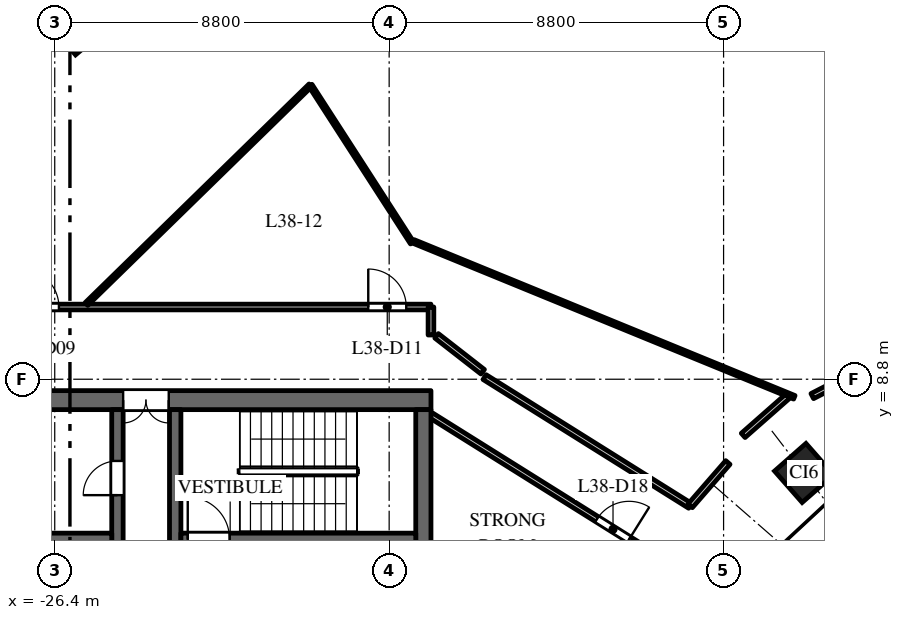
"""IFC4 building model, lengths in metres.
Left out: names, types, materials, properties, quantities, classifications, styles, units other than length and angle.
Written with IfcOpenShell. Run it as: python <this file> out.ifc"""

import sys

from ifc_helpers import new_model, si_unit, direction, frame, frame_2d, origin, origin_2d, place, context, subcontext, project, spatial, rectangle, extrude, element, fill, save


model = new_model("IFC4")
c1 = context("Model", 3, precision=1e-05, world=origin(), true_north=direction((0.0, 1.0)))
c2 = subcontext(c1, "Body", "Model", "MODEL_VIEW")
j1 = project(units=[si_unit("LENGTHUNIT", "METRE"), si_unit("PLANEANGLEUNIT", "RADIAN")], contexts=[c1])
p1 = place(None, origin())
s1 = spatial("IfcSite", under=j1, at=p1, CompositionType="ELEMENT")
p2 = place(p1, origin())
s2 = spatial("IfcBuilding", under=s1, at=p2, CompositionType="ELEMENT")
p3 = place(p2, frame((0.0, 0.0, 166.0)))
s3 = spatial("IfcBuildingStorey", under=s2, at=p3, CompositionType="ELEMENT", Elevation=166.0)
p4 = place(p3, frame((-25.783, 18.18, 0.0), z_axis=(0.0, 0.0, 1.0), x_axis=(-0.763035199656, -0.646356932419, 0.0)))
e1 = element("IfcColumn", 1, at=p4, inside=s3, PredefinedType="COLUMN", context=c2, shape_type="SweptSolid", body=[
    extrude(rectangle(XDim=1.2, YDim=1.2, at=origin_2d()), origin(), (0.0, 0.0, 1.0), 4.0),
])
p5 = place(p3, frame((-6.682, 6.334, 0.0), z_axis=(0.0, 0.0, 1.0), x_axis=(-0.75102249095, -0.660276622399, 0.0)))
e2 = element("IfcColumn", 2, at=p5, inside=s3, PredefinedType="COLUMN", context=c2, shape_type="SweptSolid", body=[
    extrude(rectangle(XDim=1.1, YDim=1.1, at=origin_2d()), origin(), (0.0, 0.0, 1.0), 4.0),
])
p6 = place(p3, frame((-16.5, 8.25, 0.0), z_axis=(0.0, 0.0, 1.0), x_axis=(-1.0, 0.0, 0.0)))
e3 = element("IfcWall", 3, at=p6, inside=s3, PredefinedType="SHEAR", context=c2, shape_type="SweptSolid", body=[
    extrude(rectangle(XDim=15.0, YDim=0.5, at=frame_2d((7.5, 0.0))), origin(), (0.0, 0.0, 1.0), 3.7),
])
p7 = place(p6, frame((6.9, 0.0, 0.0)))
e4 = element("IfcOpeningElement", 4, at=p7, cuts=e3, PredefinedType="OPENING", context=c2, shape_type="SweptSolid", body=[
    extrude(rectangle(XDim=1.2, YDim=2.1, at=frame_2d((0.6, 1.05))), frame((0.0, 0.26, 0.0), z_axis=(0.0, -1.0, 0.0), x_axis=(1.0, 0.0, 0.0)), (0.0, 0.0, 1.0), 0.52),
])
p8 = place(p6, frame((12.425, 0.0, 0.0)))
e5 = element("IfcOpeningElement", 5, at=p8, cuts=e3, PredefinedType="OPENING", context=c2, shape_type="SweptSolid", body=[
    extrude(rectangle(XDim=0.9, YDim=2.1, at=frame_2d((0.45, 1.05))), frame((0.0, 0.26, 0.0), z_axis=(0.0, -1.0, 0.0), x_axis=(1.0, 0.0, 0.0)), (0.0, 0.0, 1.0), 0.52),
])
p9 = place(p3, frame((-24.75, -8.0, 0.0), z_axis=(0.0, 0.0, 1.0), x_axis=(0.0, 1.0, 0.0)))
e6 = element("IfcWall", 6, at=p9, inside=s3, PredefinedType="SHEAR", context=c2, shape_type="SweptSolid", body=[
    extrude(rectangle(XDim=16.0, YDim=0.3, at=frame_2d((8.0, 0.0))), origin(), (0.0, 0.0, 1.0), 3.7),
])
p10 = place(p9, frame((4.425, 0.0, 0.0)))
e7 = element("IfcOpeningElement", 7, at=p10, cuts=e6, PredefinedType="OPENING", context=c2, shape_type="SweptSolid", body=[
    extrude(rectangle(XDim=1.1, YDim=2.1, at=frame_2d((0.55, 1.05))), frame((0.0, 0.16, 0.0), z_axis=(0.0, -1.0, 0.0), x_axis=(1.0, 0.0, 0.0)), (0.0, 0.0, 1.0), 0.32),
])
p11 = place(p9, frame((7.45, 0.0, 0.0)))
e8 = element("IfcOpeningElement", 8, at=p11, cuts=e6, PredefinedType="OPENING", context=c2, shape_type="SweptSolid", body=[
    extrude(rectangle(XDim=1.1, YDim=2.1, at=frame_2d((0.55, 1.05))), frame((0.0, 0.16, 0.0), z_axis=(0.0, -1.0, 0.0), x_axis=(1.0, 0.0, 0.0)), (0.0, 0.0, 1.0), 0.32),
])
p12 = place(p9, frame((10.475, 0.0, 0.0)))
e9 = element("IfcOpeningElement", 9, at=p12, cuts=e6, PredefinedType="OPENING", context=c2, shape_type="SweptSolid", body=[
    extrude(rectangle(XDim=1.1, YDim=2.1, at=frame_2d((0.55, 1.05))), frame((0.0, 0.16, 0.0), z_axis=(0.0, -1.0, 0.0), x_axis=(1.0, 0.0, 0.0)), (0.0, 0.0, 1.0), 0.32),
])
p13 = place(p9, frame((13.75, 0.0, 0.0)))
e10 = element("IfcOpeningElement", 10, at=p13, cuts=e6, PredefinedType="OPENING", context=c2, shape_type="SweptSolid", body=[
    extrude(rectangle(XDim=0.9, YDim=2.1, at=frame_2d((0.45, 1.05))), frame((0.0, 0.16, 0.0), z_axis=(0.0, -1.0, 0.0), x_axis=(1.0, 0.0, 0.0)), (0.0, 0.0, 1.0), 0.32),
])
p14 = place(p9, frame((1.975, 0.0, 0.0)))
e11 = element("IfcOpeningElement", 11, at=p14, cuts=e6, PredefinedType="OPENING", context=c2, shape_type="SweptSolid", body=[
    extrude(rectangle(XDim=0.9, YDim=2.1, at=frame_2d((0.45, 1.05))), frame((0.0, 0.16, 0.0), z_axis=(0.0, -1.0, 0.0), x_axis=(1.0, 0.0, 0.0)), (0.0, 0.0, 1.0), 0.32),
])
p15 = place(p9, frame((0.35, 0.0, 0.0)))
e12 = element("IfcOpeningElement", 12, at=p15, cuts=e6, PredefinedType="OPENING", context=c2, shape_type="SweptSolid", body=[
    extrude(rectangle(XDim=0.9, YDim=2.1, at=frame_2d((0.45, 1.05))), frame((0.0, 0.16, 0.0), z_axis=(0.0, -1.0, 0.0), x_axis=(1.0, 0.0, 0.0)), (0.0, 0.0, 1.0), 0.32),
])
p16 = place(p3, frame((-16.7, -8.0, 0.0), z_axis=(0.0, 0.0, 1.0), x_axis=(0.0, 1.0, 0.0)))
e13 = element("IfcWall", 13, at=p16, inside=s3, PredefinedType="SHEAR", context=c2, shape_type="SweptSolid", body=[
    extrude(rectangle(XDim=16.0, YDim=0.4, at=frame_2d((8.0, 0.0))), origin(), (0.0, 0.0, 1.0), 3.7),
])
p17 = place(p3, frame((-24.9, 4.6, 0.0), z_axis=(0.0, 0.0, 1.0), x_axis=(-1.0, 0.0, 0.0)))
e14 = element("IfcWall", 14, at=p17, inside=s3, PredefinedType="SHEAR", context=c2, shape_type="SweptSolid", body=[
    extrude(rectangle(XDim=6.1, YDim=0.3, at=frame_2d((3.05, 0.0))), origin(), (0.0, 0.0, 1.0), 3.7),
])
p18 = place(p17, frame((4.2, 0.0, 0.0)))
e15 = element("IfcOpeningElement", 15, at=p18, cuts=e14, PredefinedType="OPENING", context=c2, shape_type="SweptSolid", body=[
    extrude(rectangle(XDim=0.9, YDim=2.1, at=frame_2d((0.45, 1.05))), frame((0.0, 0.16, 0.0), z_axis=(0.0, -1.0, 0.0), x_axis=(1.0, 0.0, 0.0)), (0.0, 0.0, 1.0), 0.32),
])
p19 = place(p3, frame((-23.23, 2.25, 0.0), z_axis=(0.0, 0.0, 1.0), x_axis=(0.0, 1.0, 0.0)))
e16 = element("IfcWall", 16, at=p19, inside=s3, PredefinedType="SHEAR", context=c2, shape_type="SweptSolid", body=[
    extrude(rectangle(XDim=5.75, YDim=0.3, at=frame_2d((2.875, 0.0))), origin(), (0.0, 0.0, 1.0), 3.7),
])
p20 = place(p19, frame((0.6, 0.0, 0.0)))
e17 = element("IfcOpeningElement", 17, at=p20, cuts=e16, PredefinedType="OPENING", context=c2, shape_type="SweptSolid", body=[
    extrude(rectangle(XDim=1.0, YDim=2.1, at=frame_2d((0.5, 1.05))), frame((0.0, 0.16, 0.0), z_axis=(0.0, -1.0, 0.0), x_axis=(1.0, 0.0, 0.0)), (0.0, 0.0, 1.0), 0.32),
])
p21 = place(p3, frame((-16.9, 4.6, 0.0), z_axis=(0.0, 0.0, 1.0), x_axis=(-1.0, 0.0, 0.0)))
e18 = element("IfcWall", 18, at=p21, inside=s3, PredefinedType="SHEAR", context=c2, shape_type="SweptSolid", body=[
    extrude(rectangle(XDim=6.18, YDim=0.3, at=frame_2d((3.09, 0.0))), origin(), (0.0, 0.0, 1.0), 3.7),
])
p22 = place(p21, frame((4.9, 0.0, 0.0)))
e19 = element("IfcOpeningElement", 19, at=p22, cuts=e18, PredefinedType="OPENING", context=c2, shape_type="SweptSolid", body=[
    extrude(rectangle(XDim=1.1, YDim=2.1, at=frame_2d((0.55, 1.05))), frame((0.0, 0.16, 0.0), z_axis=(0.0, -1.0, 0.0), x_axis=(1.0, 0.0, 0.0)), (0.0, 0.0, 1.0), 0.32),
])
p23 = place(p3, frame((-26.396, 18.943, 0.0), z_axis=(0.0, 0.0, 1.0), x_axis=(-0.717214761864, -0.696852197647, 0.0)))
e20 = element("IfcWall", 20, at=p23, inside=s3, PredefinedType="STANDARD", context=c2, shape_type="SweptSolid", body=[
    extrude(rectangle(XDim=4.424, YDim=0.15, at=frame_2d((2.212, 0.0))), origin(), (0.0, 0.0, 1.0), 3.7),
])
p24 = place(p23, frame((1.712, 0.0, 0.0)))
e21 = element("IfcOpeningElement", 21, at=p24, cuts=e20, PredefinedType="OPENING", context=c2, shape_type="SweptSolid", body=[
    extrude(rectangle(XDim=1.0, YDim=2.4, at=frame_2d((0.5, 1.2))), frame((0.0, 0.085, 0.0), z_axis=(0.0, -1.0, 0.0), x_axis=(1.0, 0.0, 0.0)), (0.0, 0.0, 1.0), 0.17),
])
p25 = place(p3, frame((-31.5, 10.7, 0.0), z_axis=(0.0, 0.0, 1.0), x_axis=(1.0, 0.0, 0.0)))
e22 = element("IfcWall", 22, at=p25, inside=s3, PredefinedType="PARTITIONING", context=c2, shape_type="SweptSolid", body=[
    extrude(rectangle(XDim=15.0, YDim=0.15, at=frame_2d((7.5, 0.0))), origin(), (0.0, 0.0, 1.0), 3.1),
])
p26 = place(p25, frame((4.21, 0.0, 0.0)))
e23 = element("IfcOpeningElement", 23, at=p26, cuts=e22, PredefinedType="OPENING", context=c2, shape_type="SweptSolid", body=[
    extrude(rectangle(XDim=1.0, YDim=2.1, at=frame_2d((0.5, 1.05))), frame((0.0, 0.085, 0.0), z_axis=(0.0, -1.0, 0.0), x_axis=(1.0, 0.0, 0.0)), (0.0, 0.0, 1.0), 0.17),
])
p27 = place(p25, frame((13.35, 0.0, 0.0)))
e24 = element("IfcOpeningElement", 24, at=p27, cuts=e22, PredefinedType="OPENING", context=c2, shape_type="SweptSolid", body=[
    extrude(rectangle(XDim=1.0, YDim=2.1, at=frame_2d((0.5, 1.05))), frame((0.0, 0.085, 0.0), z_axis=(0.0, -1.0, 0.0), x_axis=(1.0, 0.0, 0.0)), (0.0, 0.0, 1.0), 0.17),
])
p28 = place(p3, frame((-25.566, 10.778, 0.0), z_axis=(0.0, 0.0, 1.0), x_axis=(0.715430617602, 0.698683784982, 0.0)))
e25 = element("IfcWall", 25, at=p28, inside=s3, PredefinedType="PARTITIONING", context=c2, shape_type="SweptSolid", body=[
    extrude(rectangle(XDim=8.237, YDim=0.1, at=frame_2d((4.118, 0.0))), origin(), (0.0, 0.0, 1.0), 2.75),
])
p29 = place(p3, frame((-19.673, 16.533, 0.0), z_axis=(0.0, 0.0, 1.0), x_axis=(0.542297022656, -0.840186847801, 0.0)))
e26 = element("IfcWall", 26, at=p29, inside=s3, PredefinedType="PARTITIONING", context=c2, shape_type="SweptSolid", body=[
    extrude(rectangle(XDim=4.935, YDim=0.1, at=frame_2d((2.467, 0.0))), origin(), (0.0, 0.0, 1.0), 3.7),
])
p30 = place(p3, frame((-16.963, 12.427, 0.0), z_axis=(0.0, 0.0, 1.0), x_axis=(0.925484473487, -0.378785545308, 0.0)))
e27 = element("IfcWall", 27, at=p30, inside=s3, PredefinedType="PARTITIONING", context=c2, shape_type="SweptSolid", body=[
    extrude(rectangle(XDim=10.832, YDim=0.1, at=frame_2d((5.416, 0.0))), origin(), (0.0, 0.0, 1.0), 3.7),
])
p31 = place(p3, frame((-16.5, 9.964, 0.0), z_axis=(0.0, 0.0, 1.0), x_axis=(0.0, 1.0, 0.0)))
e28 = element("IfcWall", 28, at=p31, inside=s3, PredefinedType="PARTITIONING", context=c2, shape_type="SweptSolid", body=[
    extrude(rectangle(XDim=0.736, YDim=0.15, at=frame_2d((0.368, 0.0))), origin(), (0.0, 0.0, 1.0), 3.7),
])
p32 = place(p3, frame((-16.5, 7.851, 0.0), z_axis=(0.0, 0.0, 1.0), x_axis=(0.847690706888, -0.530490777917, 0.0)))
e29 = element("IfcWall", 29, at=p32, inside=s3, PredefinedType="PARTITIONING", context=c2, shape_type="SweptSolid", body=[
    extrude(rectangle(XDim=6.781, YDim=0.15, at=frame_2d((3.39, 0.0))), origin(), (0.0, 0.0, 1.0), 3.7),
])
p33 = place(p32, frame((5.151, 0.0, 0.0)))
e30 = element("IfcOpeningElement", 30, at=p33, cuts=e29, PredefinedType="OPENING", context=c2, shape_type="SweptSolid", body=[
    extrude(rectangle(XDim=1.0, YDim=2.1, at=frame_2d((0.5, 1.05))), frame((0.0, 0.085, 0.0), z_axis=(0.0, -1.0, 0.0), x_axis=(1.0, 0.0, 0.0)), (0.0, 0.0, 1.0), 0.17),
])
p34 = place(p3, frame((-15.089, 8.856, 0.0), z_axis=(0.0, 0.0, 1.0), x_axis=(0.847602682855, -0.530631408811, 0.0)))
e31 = element("IfcWall", 31, at=p34, inside=s3, PredefinedType="PARTITIONING", context=c2, shape_type="SweptSolid", body=[
    extrude(rectangle(XDim=6.383, YDim=0.15, at=frame_2d((3.191, 0.0))), origin(), (0.0, 0.0, 1.0), 3.7),
])
p35 = place(p3, frame((-9.679, 5.469, 0.0), z_axis=(0.0, 0.0, 1.0), x_axis=(0.656454677423, 0.75436546613, 0.0)))
e32 = element("IfcWall", 32, at=p35, inside=s3, PredefinedType="PARTITIONING", context=c2, shape_type="SweptSolid", body=[
    extrude(rectangle(XDim=1.511, YDim=0.15, at=frame_2d((0.755, 0.0))), origin(), (0.0, 0.0, 1.0), 2.75),
])
p36 = place(p3, frame((-8.284, 7.322, 0.0), z_axis=(0.0, 0.0, 1.0), x_axis=(0.750666784408, 0.660680996235, 0.0)))
e33 = element("IfcWall", 33, at=p36, inside=s3, PredefinedType="PARTITIONING", context=c2, shape_type="SweptSolid", body=[
    extrude(rectangle(XDim=1.555, YDim=0.15, at=frame_2d((0.777, 0.0))), origin(), (0.0, 0.0, 1.0), 3.7),
])
p37 = place(p3, frame((-6.466, 8.356, 0.0), z_axis=(0.0, 0.0, 1.0), x_axis=(0.889472002788, 0.456989667559, 0.0)))
e34 = element("IfcWall", 34, at=p37, inside=s3, PredefinedType="PARTITIONING", context=c2, shape_type="SweptSolid", body=[
    extrude(rectangle(XDim=1.355, YDim=0.15, at=frame_2d((0.677, 0.0))), origin(), (0.0, 0.0, 1.0), 3.7),
])
p38 = place(p3, frame((-16.352, 9.942, 0.0), z_axis=(0.0, 0.0, 1.0), x_axis=(0.788950226826, -0.614457109643, 0.0)))
e35 = element("IfcWall", 35, at=p38, inside=s3, PredefinedType="PARTITIONING", context=c2, shape_type="SweptSolid", body=[
    extrude(rectangle(XDim=1.538, YDim=0.15, at=frame_2d((0.769, 0.0))), origin(), (0.0, 0.0, 1.0), 3.7),
])
p39 = place(p22, origin())
e36 = element("IfcDoor", 36, at=p39, inside=s3, OperationType="SINGLE_SWING_RIGHT", PredefinedType="DOOR", context=c2, shape_type="SweptSolid", body=[
    extrude(rectangle(XDim=1.1, YDim=2.1, at=frame_2d((0.55, 1.05))), frame((0.0, 0.025, 0.0), z_axis=(0.0, -1.0, 0.0), x_axis=(1.0, 0.0, 0.0)), (0.0, 0.0, 1.0), 0.05),
])
fill(e19, e36)
p40 = place(p7, origin())
e37 = element("IfcDoor", 37, at=p40, inside=s3, OperationType="DOUBLE_DOOR_DOUBLE_SWING", PredefinedType="DOOR", context=c2, shape_type="SweptSolid", body=[
    extrude(rectangle(XDim=1.2, YDim=2.1, at=frame_2d((0.6, 1.05))), frame((0.0, 0.025, 0.0), z_axis=(0.0, -1.0, 0.0), x_axis=(1.0, 0.0, 0.0)), (0.0, 0.0, 1.0), 0.05),
])
fill(e4, e37)
p41 = place(p13, origin())
e38 = element("IfcDoor", 38, at=p41, inside=s3, OperationType="SINGLE_SWING_RIGHT", PredefinedType="DOOR", context=c2, shape_type="SweptSolid", body=[
    extrude(rectangle(XDim=0.9, YDim=2.1, at=frame_2d((0.45, 1.05))), frame((0.0, 0.025, 0.0), z_axis=(0.0, -1.0, 0.0), x_axis=(1.0, 0.0, 0.0)), (0.0, 0.0, 1.0), 0.05),
])
fill(e10, e38)
p42 = place(p26, origin())
e39 = element("IfcDoor", 39, at=p42, inside=s3, OperationType="SINGLE_SWING_LEFT", PredefinedType="DOOR", context=c2, shape_type="SweptSolid", body=[
    extrude(rectangle(XDim=1.0, YDim=2.1, at=frame_2d((0.5, 1.05))), frame((0.0, 0.025, 0.0), z_axis=(0.0, -1.0, 0.0), x_axis=(1.0, 0.0, 0.0)), (0.0, 0.0, 1.0), 0.05),
])
fill(e23, e39)
p43 = place(p27, origin())
e40 = element("IfcDoor", 40, at=p43, inside=s3, OperationType="SINGLE_SWING_LEFT", PredefinedType="DOOR", context=c2, shape_type="SweptSolid", body=[
    extrude(rectangle(XDim=1.0, YDim=2.1, at=frame_2d((0.5, 1.05))), frame((0.0, 0.025, 0.0), z_axis=(0.0, -1.0, 0.0), x_axis=(1.0, 0.0, 0.0)), (0.0, 0.0, 1.0), 0.05),
])
fill(e24, e40)
p44 = place(p33, origin())
e41 = element("IfcDoor", 41, at=p44, inside=s3, OperationType="SINGLE_SWING_RIGHT", PredefinedType="DOOR", context=c2, shape_type="SweptSolid", body=[
    extrude(rectangle(XDim=1.0, YDim=2.1, at=frame_2d((0.5, 1.05))), frame((0.0, 0.025, 0.0), z_axis=(0.0, -1.0, 0.0), x_axis=(1.0, 0.0, 0.0)), (0.0, 0.0, 1.0), 0.05),
])
fill(e30, e41)
save(model, sys.argv[1])
